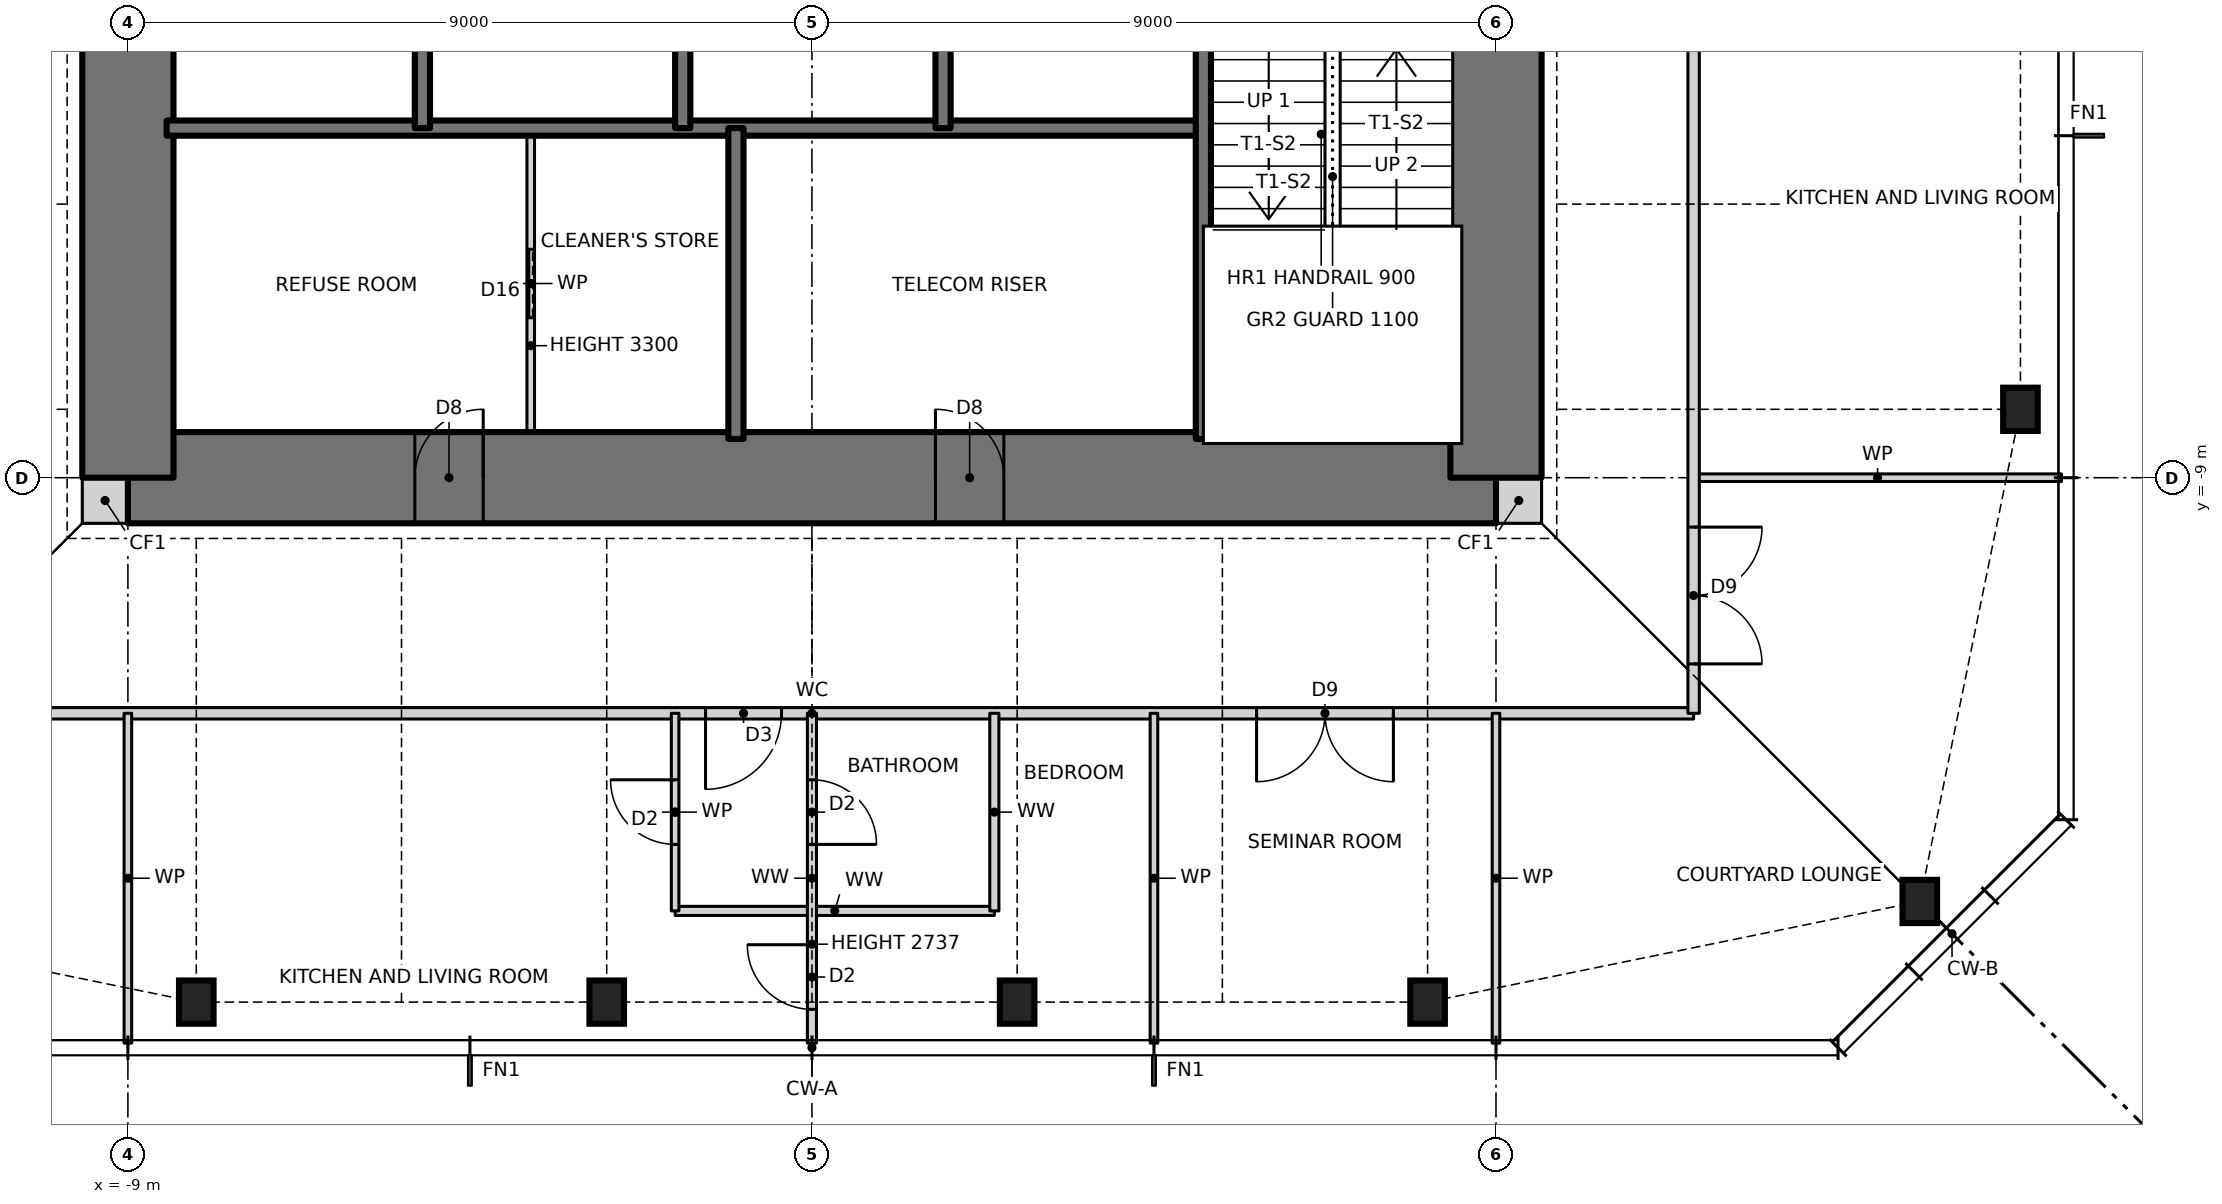
"""IFC4 building model, lengths in metres.
Left out: names, types, materials, properties, quantities, classifications, styles, units other than length and angle.
Written with IfcOpenShell. Run it as: python <this file> out.ifc"""

import sys

from ifc_helpers import new_model, si_unit, direction, frame, frame_2d, origin, origin_2d, place, context, subcontext, project, spatial, rectangle, i_section, extrude, element, fill, save


model = new_model("IFC4")
c1 = context("Model", 3, precision=1e-05, world=origin(), true_north=direction((0.0, 1.0)))
c2 = subcontext(c1, "Body", "Model", "MODEL_VIEW")
j1 = project(units=[si_unit("LENGTHUNIT", "METRE"), si_unit("PLANEANGLEUNIT", "RADIAN")], contexts=[c1])
p1 = place(None, origin())
s1 = spatial("IfcSite", under=j1, at=p1, CompositionType="ELEMENT")
p2 = place(p1, origin())
s2 = spatial("IfcBuilding", under=s1, at=p2, CompositionType="ELEMENT")
p3 = place(p2, frame((0.0, 0.0, 236.0)))
s3 = spatial("IfcBuildingStorey", under=s2, at=p3, CompositionType="ELEMENT", Elevation=236.0)
for number, where, z_axis, x_axis in (
    (1, (-8.1, -15.9, 0.0), (0.0, 0.0, 1.0), (1.0, 0.0, 0.0)),
    (2, (-2.7, -15.9, 0.0), (0.0, 0.0, 1.0), (1.0, 0.0, 0.0)),
    (3, (2.7, -15.9, 0.0), (0.0, 0.0, 1.0), (1.0, 0.0, 0.0)),
    (4, (8.1, -15.9, 0.0), (0.0, 0.0, 1.0), (1.0, 0.0, 0.0)),
    (5, (14.576, -14.576, 0.0), (0.0, 0.0, 1.0), (1.0, 0.0, 0.0)),
    (6, (15.9, -8.1, 0.0), (0.0, 0.0, 1.0), (1.0, 0.0, 0.0)),
):
    element("IfcColumn", number, at=place(p3, frame(where, z_axis=z_axis, x_axis=x_axis)), inside=s3, PredefinedType="COLUMN", context=c2, shape_type="SweptSolid", body=[
        extrude(i_section(OverallWidth=0.455, OverallDepth=0.569, WebThickness=0.078, FlangeThickness=0.125, at=origin_2d()), origin(), (0.0, 0.0, 1.0), 3.5),
    ])
for number, where, z_axis, x_axis in (
    (7, (-9.6, -9.3, 0.0), (0.0, 0.0, 1.0), (1.0, 0.0, 0.0)),
    (8, (9.0, -9.3, 0.0), (0.0, 0.0, 1.0), (1.0, 0.0, 0.0)),
):
    element("IfcWall", number, at=place(p3, frame(where, z_axis=z_axis, x_axis=x_axis)), inside=s3, PredefinedType="SOLIDWALL", context=c2, shape_type="SweptSolid", body=[
        extrude(rectangle(XDim=0.6, YDim=0.6, at=frame_2d((0.3, 0.0))), origin(), (0.0, 0.0, 1.0), 3.5),
    ])
p4 = place(p3, frame((-9.0, -9.0, 0.0), z_axis=(0.0, 0.0, 1.0), x_axis=(1.0, 0.0, 0.0)))
e9 = element("IfcWall", 9, at=p4, inside=s3, PredefinedType="SHEAR", context=c2, shape_type="SweptSolid", body=[
    extrude(rectangle(XDim=18.0, YDim=1.2, at=frame_2d((9.0, 0.0))), origin(), (0.0, 0.0, 1.0), 3.5),
])
p5 = place(p4, frame((3.775, 0.0, 0.0)))
e10 = element("IfcOpeningElement", 10, at=p5, cuts=e9, PredefinedType="OPENING", context=c2, shape_type="SweptSolid", body=[
    extrude(rectangle(XDim=0.9, YDim=2.1, at=frame_2d((0.45, 1.05))), frame((0.0, 0.61, 0.0), z_axis=(0.0, -1.0, 0.0), x_axis=(1.0, 0.0, 0.0)), (0.0, 0.0, 1.0), 1.22),
])
p6 = place(p4, frame((10.625, 0.0, 0.0)))
e11 = element("IfcOpeningElement", 11, at=p6, cuts=e9, PredefinedType="OPENING", context=c2, shape_type="SweptSolid", body=[
    extrude(rectangle(XDim=0.9, YDim=2.1, at=frame_2d((0.45, 1.05))), frame((0.0, 0.61, 0.0), z_axis=(0.0, -1.0, 0.0), x_axis=(1.0, 0.0, 0.0)), (0.0, 0.0, 1.0), 1.22),
])
p7 = place(p3, frame((9.0, -9.0, 0.0), z_axis=(0.0, 0.0, 1.0), x_axis=(0.0, 1.0, 0.0)))
e12 = element("IfcWall", 12, at=p7, inside=s3, PredefinedType="SHEAR", context=c2, shape_type="SweptSolid", body=[
    extrude(rectangle(XDim=18.0, YDim=1.2, at=frame_2d((9.0, 0.0))), origin(), (0.0, 0.0, 1.0), 3.5),
])
p8 = place(p7, frame((8.5, 0.0, 0.0)))
e13 = element("IfcOpeningElement", 13, at=p8, cuts=e12, PredefinedType="OPENING", context=c2, shape_type="SweptSolid", body=[
    extrude(rectangle(XDim=1.0, YDim=2.1, at=frame_2d((0.5, 1.05))), frame((0.0, 0.61, 0.0), z_axis=(0.0, -1.0, 0.0), x_axis=(1.0, 0.0, 0.0)), (0.0, 0.0, 1.0), 1.22),
])
p9 = place(p3, frame((-9.0, 9.0, 0.0), z_axis=(0.0, 0.0, 1.0), x_axis=(0.0, -1.0, 0.0)))
e14 = element("IfcWall", 14, at=p9, inside=s3, PredefinedType="SHEAR", context=c2, shape_type="SweptSolid", body=[
    extrude(rectangle(XDim=18.0, YDim=1.2, at=frame_2d((9.0, 0.0))), origin(), (0.0, 0.0, 1.0), 3.5),
])
p10 = place(p9, frame((8.5, 0.0, 0.0)))
e15 = element("IfcOpeningElement", 15, at=p10, cuts=e14, PredefinedType="OPENING", context=c2, shape_type="SweptSolid", body=[
    extrude(rectangle(XDim=1.0, YDim=2.1, at=frame_2d((0.5, 1.05))), frame((0.0, 0.61, 0.0), z_axis=(0.0, -1.0, 0.0), x_axis=(1.0, 0.0, 0.0)), (0.0, 0.0, 1.0), 1.22),
])
p11 = place(p3, frame((-1.8, -14.7, 0.0), z_axis=(0.0, 0.0, 1.0), x_axis=(1.0, 0.0, 0.0)))
e16 = element("IfcWall", 16, at=p11, inside=s3, PredefinedType="PARTITIONING", context=c2, shape_type="SweptSolid", body=[
    extrude(rectangle(XDim=4.2, YDim=0.12, at=frame_2d((2.1, 0.0))), origin(), (0.0, 0.0, 1.0), 3.27),
])
p12 = place(p3, frame((-11.6, -12.1, 0.0), z_axis=(0.0, 0.0, 1.0), x_axis=(1.0, 0.0, 0.0)))
e17 = element("IfcWall", 17, at=p12, inside=s3, PredefinedType="PARTITIONING", context=c2, shape_type="SweptSolid", body=[
    extrude(rectangle(XDim=23.2, YDim=0.15, at=frame_2d((11.6, 0.0))), origin(), (0.0, 0.0, 1.0), 3.27),
])
p13 = place(p12, frame((10.2, 0.0, 0.0)))
e18 = element("IfcOpeningElement", 18, at=p13, cuts=e17, PredefinedType="OPENING", context=c2, shape_type="SweptSolid", body=[
    extrude(rectangle(XDim=1.0, YDim=2.1, at=frame_2d((0.5, 1.05))), frame((0.0, 0.085, 0.0), z_axis=(0.0, -1.0, 0.0), x_axis=(1.0, 0.0, 0.0)), (0.0, 0.0, 1.0), 0.17),
])
p14 = place(p12, frame((17.45, 0.0, 0.0)))
e19 = element("IfcOpeningElement", 19, at=p14, cuts=e17, PredefinedType="OPENING", context=c2, shape_type="SweptSolid", body=[
    extrude(rectangle(XDim=1.8, YDim=2.1, at=frame_2d((0.9, 1.05))), frame((0.0, 0.085, 0.0), z_axis=(0.0, -1.0, 0.0), x_axis=(1.0, 0.0, 0.0)), (0.0, 0.0, 1.0), 0.17),
])
p15 = place(p3, frame((11.6, -9.0, 0.0), z_axis=(0.0, 0.0, 1.0), x_axis=(1.0, 0.0, 0.0)))
e20 = element("IfcWall", 20, at=p15, inside=s3, PredefinedType="PARTITIONING", context=c2, shape_type="SweptSolid", body=[
    extrude(rectangle(XDim=4.84, YDim=0.1, at=frame_2d((2.42, 0.0))), origin(), (0.0, 0.0, 1.0), 3.27),
])
p16 = place(p3, frame((-8.49, -4.4, 0.0), z_axis=(0.0, 0.0, 1.0), x_axis=(1.0, 0.0, 0.0)))
e21 = element("IfcWall", 21, at=p16, inside=s3, PredefinedType="SOLIDWALL", context=c2, shape_type="SweptSolid", body=[
    extrude(rectangle(XDim=13.64, YDim=0.2, at=frame_2d((6.82, 0.0))), origin(), (0.0, 0.0, 1.0), 3.5),
])
p17 = place(p3, frame((11.6, -12.1, 0.0), z_axis=(0.0, 0.0, 1.0), x_axis=(0.0, 1.0, 0.0)))
e22 = element("IfcWall", 22, at=p17, inside=s3, PredefinedType="PARTITIONING", context=c2, shape_type="SweptSolid", body=[
    extrude(rectangle(XDim=23.7, YDim=0.15, at=frame_2d((11.85, 0.0))), origin(), (0.0, 0.0, 1.0), 3.27),
])
p18 = place(p17, frame((10.7, 0.0, 0.0)))
e23 = element("IfcOpeningElement", 23, at=p18, cuts=e22, PredefinedType="OPENING", context=c2, shape_type="SweptSolid", body=[
    extrude(rectangle(XDim=1.0, YDim=2.1, at=frame_2d((0.5, 1.05))), frame((0.0, 0.085, 0.0), z_axis=(0.0, -1.0, 0.0), x_axis=(1.0, 0.0, 0.0)), (0.0, 0.0, 1.0), 0.17),
])
p19 = place(p17, frame((19.55, 0.0, 0.0)))
e24 = element("IfcOpeningElement", 24, at=p19, cuts=e22, PredefinedType="OPENING", context=c2, shape_type="SweptSolid", body=[
    extrude(rectangle(XDim=1.0, YDim=2.1, at=frame_2d((0.5, 1.05))), frame((0.0, 0.085, 0.0), z_axis=(0.0, -1.0, 0.0), x_axis=(1.0, 0.0, 0.0)), (0.0, 0.0, 1.0), 0.17),
])
p20 = place(p17, frame((21.5, 0.0, 0.0)))
e25 = element("IfcOpeningElement", 25, at=p20, cuts=e22, PredefinedType="OPENING", context=c2, shape_type="SweptSolid", body=[
    extrude(rectangle(XDim=1.8, YDim=2.1, at=frame_2d((0.9, 1.05))), frame((0.0, 0.085, 0.0), z_axis=(0.0, -1.0, 0.0), x_axis=(1.0, 0.0, 0.0)), (0.0, 0.0, 1.0), 0.17),
])
p21 = place(p17, frame((0.65, 0.0, 0.0)))
e26 = element("IfcOpeningElement", 26, at=p21, cuts=e22, PredefinedType="OPENING", context=c2, shape_type="SweptSolid", body=[
    extrude(rectangle(XDim=1.8, YDim=2.1, at=frame_2d((0.9, 1.05))), frame((0.0, 0.085, 0.0), z_axis=(0.0, -1.0, 0.0), x_axis=(1.0, 0.0, 0.0)), (0.0, 0.0, 1.0), 0.17),
])
p22 = place(p3, frame((9.0, -16.44, 0.0), z_axis=(0.0, 0.0, 1.0), x_axis=(0.0, 1.0, 0.0)))
e27 = element("IfcWall", 27, at=p22, inside=s3, PredefinedType="PARTITIONING", context=c2, shape_type="SweptSolid", body=[
    extrude(rectangle(XDim=4.34, YDim=0.1, at=frame_2d((2.17, 0.0))), origin(), (0.0, 0.0, 1.0), 3.27),
])
p23 = place(p3, frame((5.15, -8.49, 0.0), z_axis=(0.0, 0.0, 1.0), x_axis=(0.0, 1.0, 0.0)))
e28 = element("IfcWall", 28, at=p23, inside=s3, PredefinedType="SOLIDWALL", context=c2, shape_type="SweptSolid", body=[
    extrude(rectangle(XDim=13.09, YDim=0.2, at=frame_2d((6.545, 0.0))), origin(), (0.0, 0.0, 1.0), 3.5),
])
p24 = place(p23, frame((7.89, 0.0, 0.0)))
e29 = element("IfcOpeningElement", 29, at=p24, cuts=e28, PredefinedType="OPENING", context=c2, shape_type="SweptSolid", body=[
    extrude(rectangle(XDim=1.2, YDim=2.1, at=frame_2d((0.6, 1.05))), frame((0.0, 0.11, 0.0), z_axis=(0.0, -1.0, 0.0), x_axis=(1.0, 0.0, 0.0)), (0.0, 0.0, 1.0), 0.22),
])
p25 = place(p3, frame((4.5, -16.44, 0.0), z_axis=(0.0, 0.0, 1.0), x_axis=(0.0, 1.0, 0.0)))
e30 = element("IfcWall", 30, at=p25, inside=s3, PredefinedType="PARTITIONING", context=c2, shape_type="SweptSolid", body=[
    extrude(rectangle(XDim=4.34, YDim=0.1, at=frame_2d((2.17, 0.0))), origin(), (0.0, 0.0, 1.0), 3.27),
])
p26 = place(p3, frame((2.4, -14.7, 0.0), z_axis=(0.0, 0.0, 1.0), x_axis=(0.0, 1.0, 0.0)))
e31 = element("IfcWall", 31, at=p26, inside=s3, PredefinedType="PARTITIONING", context=c2, shape_type="SweptSolid", body=[
    extrude(rectangle(XDim=2.6, YDim=0.12, at=frame_2d((1.3, 0.0))), origin(), (0.0, 0.0, 1.0), 3.27),
])
p27 = place(p3, frame((1.725, -4.4, 0.0), z_axis=(0.0, 0.0, 1.0), x_axis=(0.0, 1.0, 0.0)))
e32 = element("IfcWall", 32, at=p27, inside=s3, PredefinedType="SOLIDWALL", context=c2, shape_type="SweptSolid", body=[
    extrude(rectangle(XDim=2.8, YDim=0.2, at=frame_2d((1.4, 0.0))), origin(), (0.0, 0.0, 1.0), 3.5),
])
p28 = place(p3, frame((0.0, -16.44, 0.0), z_axis=(0.0, 0.0, 1.0), x_axis=(0.0, 1.0, 0.0)))
e33 = element("IfcWall", 33, at=p28, inside=s3, PredefinedType="PARTITIONING", context=c2, shape_type="SweptSolid", body=[
    extrude(rectangle(XDim=4.34, YDim=0.12, at=frame_2d((2.17, 0.0))), origin(), (0.0, 0.0, 1.0), 2.737),
])
p29 = place(p28, frame((0.445, 0.0, 0.0)))
e34 = element("IfcOpeningElement", 34, at=p29, cuts=e33, PredefinedType="OPENING", context=c2, shape_type="SweptSolid", body=[
    extrude(rectangle(XDim=0.85, YDim=2.1, at=frame_2d((0.425, 1.05))), frame((0.0, 0.07, 0.0), z_axis=(0.0, -1.0, 0.0), x_axis=(1.0, 0.0, 0.0)), (0.0, 0.0, 1.0), 0.14),
])
p30 = place(p28, frame((2.615, 0.0, 0.0)))
e35 = element("IfcOpeningElement", 35, at=p30, cuts=e33, PredefinedType="OPENING", context=c2, shape_type="SweptSolid", body=[
    extrude(rectangle(XDim=0.85, YDim=2.1, at=frame_2d((0.425, 1.05))), frame((0.0, 0.07, 0.0), z_axis=(0.0, -1.0, 0.0), x_axis=(1.0, 0.0, 0.0)), (0.0, 0.0, 1.0), 0.14),
])
p31 = place(p3, frame((-1.0, -8.49, 0.0), z_axis=(0.0, 0.0, 1.0), x_axis=(0.0, 1.0, 0.0)))
e36 = element("IfcWall", 36, at=p31, inside=s3, PredefinedType="SOLIDWALL", context=c2, shape_type="SweptSolid", body=[
    extrude(rectangle(XDim=4.09, YDim=0.2, at=frame_2d((2.045, 0.0))), origin(), (0.0, 0.0, 1.0), 3.5),
])
p32 = place(p3, frame((-1.7, -4.4, 0.0), z_axis=(0.0, 0.0, 1.0), x_axis=(0.0, 1.0, 0.0)))
e37 = element("IfcWall", 37, at=p32, inside=s3, PredefinedType="SOLIDWALL", context=c2, shape_type="SweptSolid", body=[
    extrude(rectangle(XDim=2.8, YDim=0.2, at=frame_2d((1.4, 0.0))), origin(), (0.0, 0.0, 1.0), 3.5),
])
p33 = place(p3, frame((-1.8, -14.7, 0.0), z_axis=(0.0, 0.0, 1.0), x_axis=(0.0, 1.0, 0.0)))
e38 = element("IfcWall", 38, at=p33, inside=s3, PredefinedType="PARTITIONING", context=c2, shape_type="SweptSolid", body=[
    extrude(rectangle(XDim=2.6, YDim=0.1, at=frame_2d((1.3, 0.0))), origin(), (0.0, 0.0, 1.0), 3.27),
])
p34 = place(p33, frame((0.875, 0.0, 0.0)))
e39 = element("IfcOpeningElement", 39, at=p34, cuts=e38, PredefinedType="OPENING", context=c2, shape_type="SweptSolid", body=[
    extrude(rectangle(XDim=0.85, YDim=2.1, at=frame_2d((0.425, 1.05))), frame((0.0, 0.06, 0.0), z_axis=(0.0, -1.0, 0.0), x_axis=(1.0, 0.0, 0.0)), (0.0, 0.0, 1.0), 0.12),
])
p35 = place(p3, frame((-3.7, -8.49, 0.0), z_axis=(0.0, 0.0, 1.0), x_axis=(0.0, 1.0, 0.0)))
e40 = element("IfcWall", 40, at=p35, inside=s3, PredefinedType="PARTITIONING", context=c2, shape_type="SweptSolid", body=[
    extrude(rectangle(XDim=4.09, YDim=0.1, at=frame_2d((2.045, 0.0))), origin(), (0.0, 0.0, 1.0), 3.3),
])
p36 = place(p35, frame((1.595, 0.0, 0.0)))
e41 = element("IfcOpeningElement", 41, at=p36, cuts=e40, PredefinedType="OPENING", context=c2, shape_type="SweptSolid", body=[
    extrude(rectangle(XDim=0.9, YDim=2.1, at=frame_2d((0.45, 1.05))), frame((0.0, 0.06, 0.0), z_axis=(0.0, -1.0, 0.0), x_axis=(1.0, 0.0, 0.0)), (0.0, 0.0, 1.0), 0.12),
])
p37 = place(p3, frame((-5.125, -4.4, 0.0), z_axis=(0.0, 0.0, 1.0), x_axis=(0.0, 1.0, 0.0)))
e42 = element("IfcWall", 42, at=p37, inside=s3, PredefinedType="SOLIDWALL", context=c2, shape_type="SweptSolid", body=[
    extrude(rectangle(XDim=2.8, YDim=0.2, at=frame_2d((1.4, 0.0))), origin(), (0.0, 0.0, 1.0), 3.5),
])
p38 = place(p3, frame((-9.0, -16.44, 0.0), z_axis=(0.0, 0.0, 1.0), x_axis=(0.0, 1.0, 0.0)))
e43 = element("IfcWall", 43, at=p38, inside=s3, PredefinedType="PARTITIONING", context=c2, shape_type="SweptSolid", body=[
    extrude(rectangle(XDim=4.34, YDim=0.1, at=frame_2d((2.17, 0.0))), origin(), (0.0, 0.0, 1.0), 3.27),
])
p39 = place(p36, origin())
e44 = element("IfcDoor", 44, at=p39, inside=s3, OperationType="SLIDING_TO_LEFT", PredefinedType="DOOR", context=c2, shape_type="SweptSolid", body=[
    extrude(rectangle(XDim=0.9, YDim=2.1, at=frame_2d((0.45, 1.05))), frame((0.0, 0.025, 0.0), z_axis=(0.0, -1.0, 0.0), x_axis=(1.0, 0.0, 0.0)), (0.0, 0.0, 1.0), 0.05),
])
fill(e41, e44)
p40 = place(p13, frame((1.0, 0.0, 0.0), z_axis=(0.0, 0.0, 1.0), x_axis=(-1.0, 0.0, 0.0)))
e45 = element("IfcDoor", 45, at=p40, inside=s3, OperationType="SINGLE_SWING_RIGHT", PredefinedType="DOOR", context=c2, shape_type="SweptSolid", body=[
    extrude(rectangle(XDim=1.0, YDim=2.1, at=frame_2d((0.5, 1.05))), frame((0.0, 0.025, 0.0), z_axis=(0.0, -1.0, 0.0), x_axis=(1.0, 0.0, 0.0)), (0.0, 0.0, 1.0), 0.05),
])
fill(e18, e45)
p41 = place(p34, origin())
e46 = element("IfcDoor", 46, at=p41, inside=s3, OperationType="SINGLE_SWING_RIGHT", PredefinedType="DOOR", context=c2, shape_type="SweptSolid", body=[
    extrude(rectangle(XDim=0.85, YDim=2.1, at=frame_2d((0.425, 1.05))), frame((0.0, 0.025, 0.0), z_axis=(0.0, -1.0, 0.0), x_axis=(1.0, 0.0, 0.0)), (0.0, 0.0, 1.0), 0.05),
])
fill(e39, e46)
p42 = place(p29, origin())
e47 = element("IfcDoor", 47, at=p42, inside=s3, OperationType="SINGLE_SWING_RIGHT", PredefinedType="DOOR", context=c2, shape_type="SweptSolid", body=[
    extrude(rectangle(XDim=0.85, YDim=2.1, at=frame_2d((0.425, 1.05))), frame((0.0, 0.025, 0.0), z_axis=(0.0, -1.0, 0.0), x_axis=(1.0, 0.0, 0.0)), (0.0, 0.0, 1.0), 0.05),
])
fill(e34, e47)
p43 = place(p30, frame((0.85, 0.0, 0.0), z_axis=(0.0, 0.0, 1.0), x_axis=(-1.0, 0.0, 0.0)))
e48 = element("IfcDoor", 48, at=p43, inside=s3, OperationType="SINGLE_SWING_RIGHT", PredefinedType="DOOR", context=c2, shape_type="SweptSolid", body=[
    extrude(rectangle(XDim=0.85, YDim=2.1, at=frame_2d((0.425, 1.05))), frame((0.0, 0.025, 0.0), z_axis=(0.0, -1.0, 0.0), x_axis=(1.0, 0.0, 0.0)), (0.0, 0.0, 1.0), 0.05),
])
fill(e35, e48)
p44 = place(p14, frame((1.8, 0.0, 0.0), z_axis=(0.0, 0.0, 1.0), x_axis=(-1.0, 0.0, 0.0)))
e49 = element("IfcDoor", 49, at=p44, inside=s3, OperationType="DOUBLE_DOOR_SINGLE_SWING", PredefinedType="DOOR", context=c2, shape_type="SweptSolid", body=[
    extrude(rectangle(XDim=1.8, YDim=2.1, at=frame_2d((0.9, 1.05))), frame((0.0, 0.025, 0.0), z_axis=(0.0, -1.0, 0.0), x_axis=(1.0, 0.0, 0.0)), (0.0, 0.0, 1.0), 0.05),
])
fill(e19, e49)
p45 = place(p21, frame((1.8, 0.0, 0.0), z_axis=(0.0, 0.0, 1.0), x_axis=(-1.0, 0.0, 0.0)))
e50 = element("IfcDoor", 50, at=p45, inside=s3, OperationType="DOUBLE_DOOR_SINGLE_SWING", PredefinedType="DOOR", context=c2, shape_type="SweptSolid", body=[
    extrude(rectangle(XDim=1.8, YDim=2.1, at=frame_2d((0.9, 1.05))), frame((0.0, 0.025, 0.0), z_axis=(0.0, -1.0, 0.0), x_axis=(1.0, 0.0, 0.0)), (0.0, 0.0, 1.0), 0.05),
])
fill(e26, e50)
p46 = place(p5, origin())
e51 = element("IfcDoor", 51, at=p46, inside=s3, OperationType="SINGLE_SWING_RIGHT", PredefinedType="DOOR", context=c2, shape_type="SweptSolid", body=[
    extrude(rectangle(XDim=0.9, YDim=2.1, at=frame_2d((0.45, 1.05))), frame((0.0, 0.025, 0.0), z_axis=(0.0, -1.0, 0.0), x_axis=(1.0, 0.0, 0.0)), (0.0, 0.0, 1.0), 0.05),
])
fill(e10, e51)
p47 = place(p6, origin())
e52 = element("IfcDoor", 52, at=p47, inside=s3, OperationType="SINGLE_SWING_LEFT", PredefinedType="DOOR", context=c2, shape_type="SweptSolid", body=[
    extrude(rectangle(XDim=0.9, YDim=2.1, at=frame_2d((0.45, 1.05))), frame((0.0, 0.025, 0.0), z_axis=(0.0, -1.0, 0.0), x_axis=(1.0, 0.0, 0.0)), (0.0, 0.0, 1.0), 0.05),
])
fill(e11, e52)
save(model, sys.argv[1])
